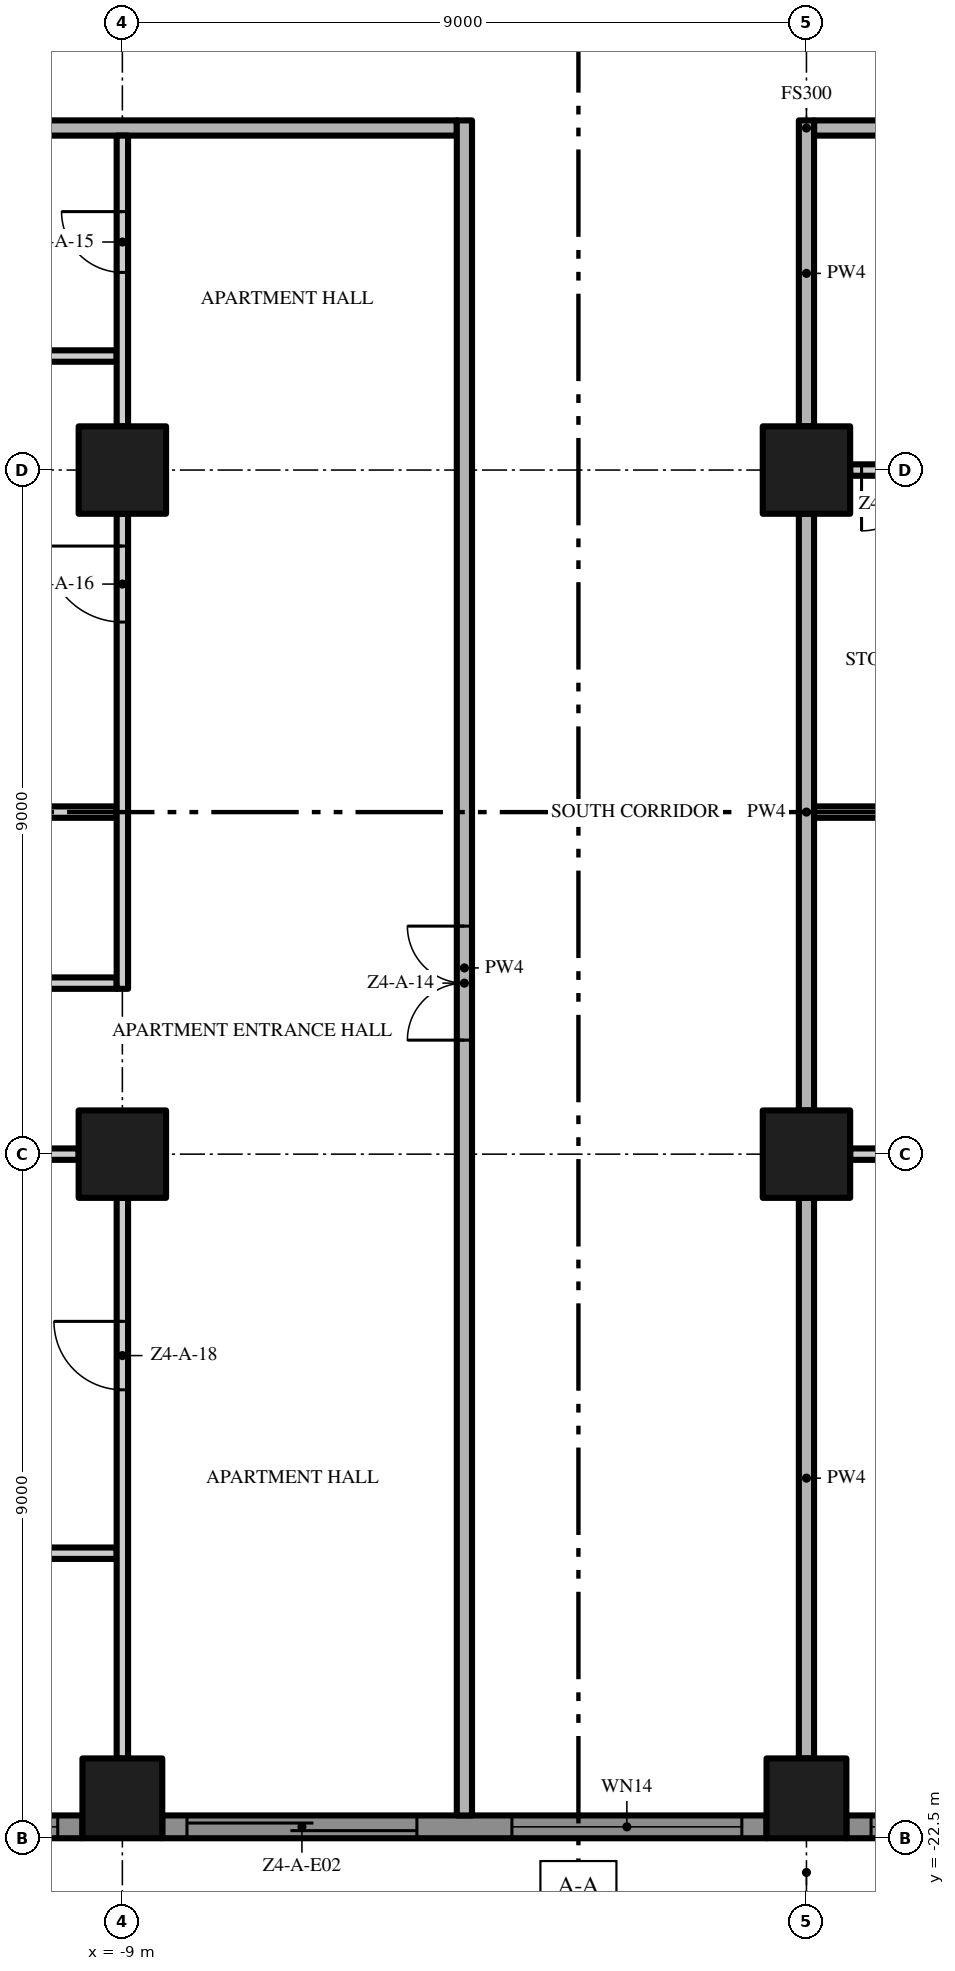
"""IFC4 building model, lengths in metres.
Left out: names, types, materials, properties, quantities, classifications, styles, units other than length and angle.
Written with IfcOpenShell. Run it as: python <this file> out.ifc"""

import sys

from ifc_helpers import new_model, si_unit, direction, frame, frame_2d, origin, origin_2d, place, context, subcontext, project, spatial, polyline, rectangle, outline, extrude, element, fill, save


model = new_model("IFC4")
c1 = context("Model", 3, precision=1e-05, world=origin(), true_north=direction((0.0, 1.0)))
c2 = subcontext(c1, "Body", "Model", "MODEL_VIEW")
j1 = project(units=[si_unit("LENGTHUNIT", "METRE"), si_unit("PLANEANGLEUNIT", "RADIAN")], contexts=[c1])
p1 = place(None, origin())
s1 = spatial("IfcSite", under=j1, at=p1, CompositionType="ELEMENT")
p2 = place(p1, origin())
s2 = spatial("IfcBuilding", under=s1, at=p2, CompositionType="ELEMENT")
p3 = place(p2, frame((0.0, 0.0, 184.4)))
s3 = spatial("IfcBuildingStorey", under=s2, at=p3, CompositionType="ELEMENT", Elevation=184.4)
p4 = place(p3, frame((-9.0, -13.5, 0.0), z_axis=(0.0, 0.0, 1.0), x_axis=(1.0, 0.0, 0.0)))
e1 = element("IfcColumn", 1, at=p4, inside=s3, PredefinedType="COLUMN", context=c2, shape_type="SweptSolid", body=[
    extrude(rectangle(XDim=1.15, YDim=1.15, at=origin_2d()), origin(), (0.0, 0.0, 1.0), 3.5),
])
p5 = place(p3, frame((-9.0, -21.975, 0.0), z_axis=(0.0, 0.0, 1.0), x_axis=(1.0, 0.0, 0.0)))
e2 = element("IfcColumn", 2, at=p5, inside=s3, PredefinedType="COLUMN", context=c2, shape_type="SweptSolid", body=[
    extrude(rectangle(XDim=1.05, YDim=1.05, at=origin_2d()), origin(), (0.0, 0.0, 1.0), 3.5),
])
for number, where, z_axis, x_axis in (
    (3, (-9.0, -4.5, 0.0), (0.0, 0.0, 1.0), (1.0, 0.0, 0.0)),
    (4, (0.0, -13.5, 0.0), (0.0, 0.0, 1.0), (1.0, 0.0, 0.0)),
):
    element("IfcColumn", number, at=place(p3, frame(where, z_axis=z_axis, x_axis=x_axis)), inside=s3, PredefinedType="COLUMN", context=c2, shape_type="SweptSolid", body=[
        extrude(rectangle(XDim=1.15, YDim=1.15, at=origin_2d()), origin(), (0.0, 0.0, 1.0), 3.5),
    ])
p6 = place(p3, frame((0.0, -21.975, 0.0), z_axis=(0.0, 0.0, 1.0), x_axis=(1.0, 0.0, 0.0)))
e5 = element("IfcColumn", 5, at=p6, inside=s3, PredefinedType="COLUMN", context=c2, shape_type="SweptSolid", body=[
    extrude(rectangle(XDim=1.05, YDim=1.05, at=origin_2d()), origin(), (0.0, 0.0, 1.0), 3.5),
])
p7 = place(p3, frame((0.0, -4.5, 0.0), z_axis=(0.0, 0.0, 1.0), x_axis=(1.0, 0.0, 0.0)))
e6 = element("IfcColumn", 6, at=p7, inside=s3, PredefinedType="COLUMN", context=c2, shape_type="SweptSolid", body=[
    extrude(rectangle(XDim=1.15, YDim=1.15, at=origin_2d()), origin(), (0.0, 0.0, 1.0), 3.5),
])
p8 = place(p3, frame((-9.525, -22.35, 0.0), z_axis=(0.0, 0.0, 1.0), x_axis=(-1.0, 0.0, 0.0)))
e7 = element("IfcWall", 7, at=p8, inside=s3, PredefinedType="SOLIDWALL", context=c2, shape_type="SweptSolid", body=[
    extrude(rectangle(XDim=7.95, YDim=0.3, at=frame_2d((3.975, 0.0))), origin(), (0.0, 0.0, 1.0), 3.5),
])
p9 = place(p8, frame((4.6, 0.0, 0.45)))
e8 = element("IfcOpeningElement", 8, at=p9, cuts=e7, PredefinedType="OPENING", context=c2, shape_type="SweptSolid", body=[
    extrude(rectangle(XDim=3.025, YDim=2.65, at=frame_2d((1.512, 1.325))), frame((0.0, 0.16, 0.0), z_axis=(0.0, -1.0, 0.0), x_axis=(1.0, 0.0, 0.0)), (0.0, 0.0, 1.0), 0.32),
])
p10 = place(p8, frame((0.325, 0.0, 0.45)))
e9 = element("IfcOpeningElement", 9, at=p10, cuts=e7, PredefinedType="OPENING", context=c2, shape_type="SweptSolid", body=[
    extrude(rectangle(XDim=3.025, YDim=2.65, at=frame_2d((1.512, 1.325))), frame((0.0, 0.16, 0.0), z_axis=(0.0, -1.0, 0.0), x_axis=(1.0, 0.0, 0.0)), (0.0, 0.0, 1.0), 0.32),
])
p11 = place(p3, frame((-0.525, -22.35, 0.0), z_axis=(0.0, 0.0, 1.0), x_axis=(-1.0, 0.0, 0.0)))
e10 = element("IfcWall", 10, at=p11, inside=s3, PredefinedType="SOLIDWALL", context=c2, shape_type="SweptSolid", body=[
    extrude(rectangle(XDim=7.95, YDim=0.3, at=frame_2d((3.975, 0.0))), origin(), (0.0, 0.0, 1.0), 3.5),
])
p12 = place(p11, frame((4.6, 0.0, 0.0)))
e11 = element("IfcOpeningElement", 11, at=p12, cuts=e10, PredefinedType="OPENING", context=c2, shape_type="SweptSolid", body=[
    extrude(rectangle(XDim=3.025, YDim=2.4, at=frame_2d((1.512, 1.2))), frame((0.0, 0.16, 0.0), z_axis=(0.0, -1.0, 0.0), x_axis=(1.0, 0.0, 0.0)), (0.0, 0.0, 1.0), 0.32),
])
p13 = place(p11, frame((0.325, 0.0, 0.45)))
e12 = element("IfcOpeningElement", 12, at=p13, cuts=e10, PredefinedType="OPENING", context=c2, shape_type="SweptSolid", body=[
    extrude(rectangle(XDim=3.025, YDim=2.65, at=frame_2d((1.512, 1.325))), frame((0.0, 0.16, 0.0), z_axis=(0.0, -1.0, 0.0), x_axis=(1.0, 0.0, 0.0)), (0.0, 0.0, 1.0), 0.32),
])
p14 = place(p3, frame((8.475, -22.35, 0.0), z_axis=(0.0, 0.0, 1.0), x_axis=(-1.0, 0.0, 0.0)))
e13 = element("IfcWall", 13, at=p14, inside=s3, PredefinedType="SOLIDWALL", context=c2, shape_type="SweptSolid", body=[
    extrude(rectangle(XDim=7.95, YDim=0.3, at=frame_2d((3.975, 0.0))), origin(), (0.0, 0.0, 1.0), 3.5),
])
p15 = place(p14, frame((4.6, 0.0, 0.45)))
e14 = element("IfcOpeningElement", 14, at=p15, cuts=e13, PredefinedType="OPENING", context=c2, shape_type="SweptSolid", body=[
    extrude(rectangle(XDim=3.025, YDim=2.65, at=frame_2d((1.512, 1.325))), frame((0.0, 0.16, 0.0), z_axis=(0.0, -1.0, 0.0), x_axis=(1.0, 0.0, 0.0)), (0.0, 0.0, 1.0), 0.32),
])
p16 = place(p14, frame((0.325, 0.0, 0.0)))
e15 = element("IfcOpeningElement", 15, at=p16, cuts=e13, PredefinedType="OPENING", context=c2, shape_type="SweptSolid", body=[
    extrude(rectangle(XDim=3.025, YDim=2.4, at=frame_2d((1.512, 1.2))), frame((0.0, 0.16, 0.0), z_axis=(0.0, -1.0, 0.0), x_axis=(1.0, 0.0, 0.0)), (0.0, 0.0, 1.0), 0.32),
])
p17 = place(p3, origin())
e16 = element("IfcWall", 16, at=p17, inside=s3, PredefinedType="USERDEFINED", context=c2, shape_type="SweptSolid", body=[
    extrude(outline(polyline([(-22.5, -25.149), (-21.0, -25.485), (-20.625, -25.5), (-19.5, -25.369), (-18.0, -24.845), (-16.5, -24.112), (-15.0, -23.451), (-13.5, -23.115), (-13.125, -23.1), (-12.0, -23.231), (-10.5, -23.755), (-9.0, -24.488), (-7.5, -25.149), (-6.0, -25.485), (-5.625, -25.5), (-4.5, -25.369), (-3.0, -24.845), (-1.5, -24.112), (0.0, -23.451), (1.5, -23.115), (1.875, -23.1), (3.0, -23.231), (4.5, -23.755), (6.0, -24.488), (7.5, -25.149), (9.0, -25.485), (9.375, -25.5), (10.5, -25.369), (12.0, -24.845), (13.5, -24.112), (15.0, -23.451), (16.5, -23.115), (16.875, -23.1), (18.0, -23.231), (19.5, -23.755), (21.0, -24.488), (22.5, -25.149), (22.601, -24.92), (21.105, -24.261), (19.596, -23.524), (18.056, -22.986), (16.885, -22.849), (16.467, -22.866), (14.921, -23.213), (13.395, -23.885), (11.904, -24.614), (10.444, -25.124), (9.365, -25.249), (9.033, -25.236), (7.579, -24.91), (6.105, -24.261), (4.596, -23.524), (3.056, -22.986), (1.885, -22.849), (1.467, -22.866), (-0.079, -23.213), (-1.605, -23.885), (-3.096, -24.614), (-4.556, -25.124), (-5.635, -25.249), (-5.967, -25.236), (-7.421, -24.91), (-8.895, -24.261), (-10.404, -23.524), (-11.944, -22.986), (-13.115, -22.849), (-13.533, -22.866), (-15.079, -23.213), (-16.605, -23.885), (-18.096, -24.614), (-19.556, -25.124), (-20.635, -25.249), (-20.967, -25.236), (-22.445, -24.905), (-22.5, -25.149)])), origin(), (0.0, 0.0, 1.0), 0.9),
])
p18 = place(p3, frame((-9.075, -18.75, 0.0), z_axis=(0.0, 0.0, 1.0), x_axis=(-1.0, 0.0, 0.0)))
e17 = element("IfcWall", 17, at=p18, inside=s3, PredefinedType="PARTITIONING", context=c2, shape_type="SweptSolid", body=[
    extrude(rectangle(XDim=4.35, YDim=0.15, at=frame_2d((2.175, 0.0))), origin(), (0.0, 0.0, 1.0), 3.5),
])
p19 = place(p18, frame((1.7, 0.0, 0.0)))
e18 = element("IfcOpeningElement", 18, at=p19, cuts=e17, PredefinedType="OPENING", context=c2, shape_type="SweptSolid", body=[
    extrude(rectangle(XDim=0.9, YDim=2.1, at=frame_2d((0.45, 1.05))), frame((0.0, 0.085, 0.0), z_axis=(0.0, -1.0, 0.0), x_axis=(1.0, 0.0, 0.0)), (0.0, 0.0, 1.0), 0.17),
])
p20 = place(p3, frame((-13.425, -13.5, 0.0), z_axis=(0.0, 0.0, 1.0), x_axis=(1.0, 0.0, 0.0)))
e19 = element("IfcWall", 19, at=p20, inside=s3, PredefinedType="PARTITIONING", context=c2, shape_type="SweptSolid", body=[
    extrude(rectangle(XDim=3.85, YDim=0.15, at=frame_2d((1.925, 0.0))), origin(), (0.0, 0.0, 1.0), 3.5),
])
p21 = place(p3, frame((8.425, -13.5, 0.0), z_axis=(0.0, 0.0, 1.0), x_axis=(-1.0, 0.0, 0.0)))
e20 = element("IfcWall", 20, at=p21, inside=s3, PredefinedType="PARTITIONING", context=c2, shape_type="SweptSolid", body=[
    extrude(rectangle(XDim=7.85, YDim=0.15, at=frame_2d((3.925, 0.0))), origin(), (0.0, 0.0, 1.0), 3.5),
])
p22 = place(p21, frame((4.15, 0.0, 0.0)))
e21 = element("IfcOpeningElement", 21, at=p22, cuts=e20, PredefinedType="OPENING", context=c2, shape_type="SweptSolid", body=[
    extrude(rectangle(XDim=1.8, YDim=2.4, at=frame_2d((0.9, 1.2))), frame((0.0, 0.085, 0.0), z_axis=(0.0, -1.0, 0.0), x_axis=(1.0, 0.0, 0.0)), (0.0, 0.0, 1.0), 0.17),
])
p23 = place(p3, frame((-13.425, -11.25, 0.0), z_axis=(0.0, 0.0, 1.0), x_axis=(1.0, 0.0, 0.0)))
e22 = element("IfcWall", 22, at=p23, inside=s3, PredefinedType="PARTITIONING", context=c2, shape_type="SweptSolid", body=[
    extrude(rectangle(XDim=4.35, YDim=0.15, at=frame_2d((2.175, 0.0))), origin(), (0.0, 0.0, 1.0), 3.5),
])
p24 = place(p23, frame((1.75, 0.0, 0.0)))
e23 = element("IfcOpeningElement", 23, at=p24, cuts=e22, PredefinedType="OPENING", context=c2, shape_type="SweptSolid", body=[
    extrude(rectangle(XDim=0.9, YDim=2.1, at=frame_2d((0.45, 1.05))), frame((0.0, 0.085, 0.0), z_axis=(0.0, -1.0, 0.0), x_axis=(1.0, 0.0, 0.0)), (0.0, 0.0, 1.0), 0.17),
])
p25 = place(p3, frame((-13.425, -9.0, 0.0), z_axis=(0.0, 0.0, 1.0), x_axis=(1.0, 0.0, 0.0)))
e24 = element("IfcWall", 24, at=p25, inside=s3, PredefinedType="PARTITIONING", context=c2, shape_type="SweptSolid", body=[
    extrude(rectangle(XDim=4.35, YDim=0.15, at=frame_2d((2.175, 0.0))), origin(), (0.0, 0.0, 1.0), 3.5),
])
p26 = place(p3, frame((0.1, -9.0, 0.0), z_axis=(0.0, 0.0, 1.0), x_axis=(1.0, 0.0, 0.0)))
e25 = element("IfcWall", 25, at=p26, inside=s3, PredefinedType="PARTITIONING", context=c2, shape_type="SweptSolid", body=[
    extrude(rectangle(XDim=13.4, YDim=0.15, at=frame_2d((6.7, 0.0))), origin(), (0.0, 0.0, 1.0), 3.5),
])
p27 = place(p26, frame((6.9, 0.0, 0.0)))
e26 = element("IfcOpeningElement", 26, at=p27, cuts=e25, PredefinedType="OPENING", context=c2, shape_type="SweptSolid", body=[
    extrude(rectangle(XDim=1.0, YDim=2.4, at=frame_2d((0.5, 1.2))), frame((0.0, 0.085, 0.0), z_axis=(0.0, -1.0, 0.0), x_axis=(1.0, 0.0, 0.0)), (0.0, 0.0, 1.0), 0.17),
])
p28 = place(p3, frame((8.425, -4.5, 0.0), z_axis=(0.0, 0.0, 1.0), x_axis=(-1.0, 0.0, 0.0)))
e27 = element("IfcWall", 27, at=p28, inside=s3, PredefinedType="PARTITIONING", context=c2, shape_type="SweptSolid", body=[
    extrude(rectangle(XDim=7.85, YDim=0.15, at=frame_2d((3.925, 0.0))), origin(), (0.0, 0.0, 1.0), 3.5),
])
p29 = place(p28, frame((6.9, 0.0, 0.0)))
e28 = element("IfcOpeningElement", 28, at=p29, cuts=e27, PredefinedType="OPENING", context=c2, shape_type="SweptSolid", body=[
    extrude(rectangle(XDim=0.8, YDim=2.0, at=frame_2d((0.4, 1.0))), frame((0.0, 0.085, 0.0), z_axis=(0.0, -1.0, 0.0), x_axis=(1.0, 0.0, 0.0)), (0.0, 0.0, 1.0), 0.17),
])
p30 = place(p28, frame((4.875, 0.0, 0.0)))
e29 = element("IfcOpeningElement", 29, at=p30, cuts=e27, PredefinedType="OPENING", context=c2, shape_type="SweptSolid", body=[
    extrude(rectangle(XDim=0.8, YDim=2.0, at=frame_2d((0.4, 1.0))), frame((0.0, 0.085, 0.0), z_axis=(0.0, -1.0, 0.0), x_axis=(1.0, 0.0, 0.0)), (0.0, 0.0, 1.0), 0.17),
])
p31 = place(p3, frame((-13.425, -3.0, 0.0), z_axis=(0.0, 0.0, 1.0), x_axis=(1.0, 0.0, 0.0)))
e30 = element("IfcWall", 30, at=p31, inside=s3, PredefinedType="PARTITIONING", context=c2, shape_type="SweptSolid", body=[
    extrude(rectangle(XDim=4.35, YDim=0.15, at=frame_2d((2.175, 0.0))), origin(), (0.0, 0.0, 1.0), 3.5),
])
p32 = place(p3, frame((-17.4, 0.0, 0.0), z_axis=(0.0, 0.0, 1.0), x_axis=(1.0, 0.0, 0.0)))
e31 = element("IfcWall", 31, at=p32, inside=s3, PredefinedType="PARTITIONING", context=c2, shape_type="SweptSolid", body=[
    extrude(rectangle(XDim=12.8, YDim=0.2, at=frame_2d((6.4, 0.0))), origin(), (0.0, 0.0, 1.0), 3.5),
])
p33 = place(p3, frame((17.4, 0.0, 0.0), z_axis=(0.0, 0.0, 1.0), x_axis=(-1.0, 0.0, 0.0)))
e32 = element("IfcWall", 32, at=p33, inside=s3, PredefinedType="PARTITIONING", context=c2, shape_type="SweptSolid", body=[
    extrude(rectangle(XDim=17.3, YDim=0.2, at=frame_2d((8.65, 0.0))), origin(), (0.0, 0.0, 1.0), 3.5),
])
p34 = place(p33, frame((7.65, 0.0, 0.0)))
e33 = element("IfcOpeningElement", 33, at=p34, cuts=e32, PredefinedType="OPENING", context=c2, shape_type="SweptSolid", body=[
    extrude(rectangle(XDim=1.5, YDim=2.4, at=frame_2d((0.75, 1.2))), frame((0.0, 0.11, 0.0), z_axis=(0.0, -1.0, 0.0), x_axis=(1.0, 0.0, 0.0)), (0.0, 0.0, 1.0), 0.22),
])
p35 = place(p3, frame((-9.0, -21.45, 0.0), z_axis=(0.0, 0.0, 1.0), x_axis=(0.0, 1.0, 0.0)))
e34 = element("IfcWall", 34, at=p35, inside=s3, PredefinedType="PARTITIONING", context=c2, shape_type="SweptSolid", body=[
    extrude(rectangle(XDim=7.375, YDim=0.15, at=frame_2d((3.688, 0.0))), origin(), (0.0, 0.0, 1.0), 3.5),
])
p36 = place(p35, frame((4.85, 0.0, 0.0)))
e35 = element("IfcOpeningElement", 35, at=p36, cuts=e34, PredefinedType="OPENING", context=c2, shape_type="SweptSolid", body=[
    extrude(rectangle(XDim=0.9, YDim=2.1, at=frame_2d((0.45, 1.05))), frame((0.0, 0.085, 0.0), z_axis=(0.0, -1.0, 0.0), x_axis=(1.0, 0.0, 0.0)), (0.0, 0.0, 1.0), 0.17),
])
p37 = place(p3, frame((-9.0, -11.325, 0.0), z_axis=(0.0, 0.0, 1.0), x_axis=(0.0, 1.0, 0.0)))
e36 = element("IfcWall", 36, at=p37, inside=s3, PredefinedType="PARTITIONING", context=c2, shape_type="SweptSolid", body=[
    extrude(rectangle(XDim=6.25, YDim=0.15, at=frame_2d((3.125, 0.0))), origin(), (0.0, 0.0, 1.0), 3.5),
])
p38 = place(p37, frame((4.825, 0.0, 0.0)))
e37 = element("IfcOpeningElement", 37, at=p38, cuts=e36, PredefinedType="OPENING", context=c2, shape_type="SweptSolid", body=[
    extrude(rectangle(XDim=1.0, YDim=2.4, at=frame_2d((0.5, 1.2))), frame((0.0, 0.085, 0.0), z_axis=(0.0, -1.0, 0.0), x_axis=(1.0, 0.0, 0.0)), (0.0, 0.0, 1.0), 0.17),
])
p39 = place(p3, frame((-9.0, -3.925, 0.0), z_axis=(0.0, 0.0, 1.0), x_axis=(0.0, 1.0, 0.0)))
e38 = element("IfcWall", 38, at=p39, inside=s3, PredefinedType="PARTITIONING", context=c2, shape_type="SweptSolid", body=[
    extrude(rectangle(XDim=3.825, YDim=0.15, at=frame_2d((1.913, 0.0))), origin(), (0.0, 0.0, 1.0), 3.5),
])
p40 = place(p39, frame((2.025, 0.0, 0.0)))
e39 = element("IfcOpeningElement", 39, at=p40, cuts=e38, PredefinedType="OPENING", context=c2, shape_type="SweptSolid", body=[
    extrude(rectangle(XDim=0.8, YDim=2.0, at=frame_2d((0.4, 1.0))), frame((0.0, 0.085, 0.0), z_axis=(0.0, -1.0, 0.0), x_axis=(1.0, 0.0, 0.0)), (0.0, 0.0, 1.0), 0.17),
])
p41 = place(p3, frame((-4.5, -22.2, 0.0), z_axis=(0.0, 0.0, 1.0), x_axis=(0.0, 1.0, 0.0)))
e40 = element("IfcWall", 40, at=p41, inside=s3, PredefinedType="PARTITIONING", context=c2, shape_type="SweptSolid", body=[
    extrude(rectangle(XDim=22.3, YDim=0.2, at=frame_2d((11.15, 0.0))), origin(), (0.0, 0.0, 1.0), 3.5),
])
p42 = place(p41, frame((10.2, 0.0, 0.0)))
e41 = element("IfcOpeningElement", 41, at=p42, cuts=e40, PredefinedType="OPENING", context=c2, shape_type="SweptSolid", body=[
    extrude(rectangle(XDim=1.5, YDim=2.4, at=frame_2d((0.75, 1.2))), frame((0.0, 0.11, 0.0), z_axis=(0.0, -1.0, 0.0), x_axis=(1.0, 0.0, 0.0)), (0.0, 0.0, 1.0), 0.22),
])
p43 = place(p3, frame((0.0, -21.45, 0.0), z_axis=(0.0, 0.0, 1.0), x_axis=(0.0, 1.0, 0.0)))
e42 = element("IfcWall", 42, at=p43, inside=s3, PredefinedType="PARTITIONING", context=c2, shape_type="SweptSolid", body=[
    extrude(rectangle(XDim=7.375, YDim=0.2, at=frame_2d((3.688, 0.0))), origin(), (0.0, 0.0, 1.0), 3.5),
])
p44 = place(p3, frame((0.0, -12.925, 0.0), z_axis=(0.0, 0.0, 1.0), x_axis=(0.0, 1.0, 0.0)))
e43 = element("IfcWall", 43, at=p44, inside=s3, PredefinedType="PARTITIONING", context=c2, shape_type="SweptSolid", body=[
    extrude(rectangle(XDim=7.85, YDim=0.2, at=frame_2d((3.925, 0.0))), origin(), (0.0, 0.0, 1.0), 3.5),
])
p45 = place(p3, frame((0.0, -3.925, 0.0), z_axis=(0.0, 0.0, 1.0), x_axis=(0.0, 1.0, 0.0)))
e44 = element("IfcWall", 44, at=p45, inside=s3, PredefinedType="PARTITIONING", context=c2, shape_type="SweptSolid", body=[
    extrude(rectangle(XDim=4.025, YDim=0.2, at=frame_2d((2.013, 0.0))), origin(), (0.0, 0.0, 1.0), 3.5),
])
p46 = place(p10, origin())
e45 = element("IfcWindow", 45, at=p46, inside=s3, PartitioningType="SINGLE_PANEL", PredefinedType="WINDOW", context=c2, shape_type="SweptSolid", body=[
    extrude(rectangle(XDim=3.025, YDim=2.65, at=frame_2d((1.512, 1.325))), frame((0.0, 0.03, 0.0), z_axis=(0.0, -1.0, 0.0), x_axis=(1.0, 0.0, 0.0)), (0.0, 0.0, 1.0), 0.06),
])
fill(e9, e45)
p47 = place(p12, origin())
e46 = element("IfcDoor", 46, at=p47, inside=s3, OperationType="SINGLE_SWING_LEFT", PredefinedType="DOOR", context=c2, shape_type="SweptSolid", body=[
    extrude(rectangle(XDim=3.025, YDim=2.4, at=frame_2d((1.512, 1.2))), frame((0.0, 0.025, 0.0), z_axis=(0.0, -1.0, 0.0), x_axis=(1.0, 0.0, 0.0)), (0.0, 0.0, 1.0), 0.05),
])
fill(e11, e46)
p48 = place(p13, origin())
e47 = element("IfcWindow", 47, at=p48, inside=s3, PartitioningType="SINGLE_PANEL", PredefinedType="WINDOW", context=c2, shape_type="SweptSolid", body=[
    extrude(rectangle(XDim=3.025, YDim=2.65, at=frame_2d((1.512, 1.325))), frame((0.0, 0.03, 0.0), z_axis=(0.0, -1.0, 0.0), x_axis=(1.0, 0.0, 0.0)), (0.0, 0.0, 1.0), 0.06),
])
fill(e12, e47)
p49 = place(p15, origin())
e48 = element("IfcWindow", 48, at=p49, inside=s3, PartitioningType="SINGLE_PANEL", PredefinedType="WINDOW", context=c2, shape_type="SweptSolid", body=[
    extrude(rectangle(XDim=3.025, YDim=2.65, at=frame_2d((1.512, 1.325))), frame((0.0, 0.03, 0.0), z_axis=(0.0, -1.0, 0.0), x_axis=(1.0, 0.0, 0.0)), (0.0, 0.0, 1.0), 0.06),
])
fill(e14, e48)
p50 = place(p42, origin())
e49 = element("IfcDoor", 49, at=p50, inside=s3, OperationType="DOUBLE_DOOR_SINGLE_SWING", PredefinedType="DOOR", context=c2, shape_type="SweptSolid", body=[
    extrude(rectangle(XDim=1.5, YDim=2.4, at=frame_2d((0.75, 1.2))), frame((0.0, 0.025, 0.0), z_axis=(0.0, -1.0, 0.0), x_axis=(1.0, 0.0, 0.0)), (0.0, 0.0, 1.0), 0.05),
])
fill(e41, e49)
p51 = place(p40, origin())
e50 = element("IfcDoor", 50, at=p51, inside=s3, OperationType="SINGLE_SWING_RIGHT", PredefinedType="DOOR", context=c2, shape_type="SweptSolid", body=[
    extrude(rectangle(XDim=0.8, YDim=2.0, at=frame_2d((0.4, 1.0))), frame((0.0, 0.025, 0.0), z_axis=(0.0, -1.0, 0.0), x_axis=(1.0, 0.0, 0.0)), (0.0, 0.0, 1.0), 0.05),
])
fill(e39, e50)
p52 = place(p38, origin())
e51 = element("IfcDoor", 51, at=p52, inside=s3, OperationType="SINGLE_SWING_RIGHT", PredefinedType="DOOR", context=c2, shape_type="SweptSolid", body=[
    extrude(rectangle(XDim=1.0, YDim=2.4, at=frame_2d((0.5, 1.2))), frame((0.0, 0.025, 0.0), z_axis=(0.0, -1.0, 0.0), x_axis=(1.0, 0.0, 0.0)), (0.0, 0.0, 1.0), 0.05),
])
fill(e37, e51)
p53 = place(p36, origin())
e52 = element("IfcDoor", 52, at=p53, inside=s3, OperationType="SINGLE_SWING_RIGHT", PredefinedType="DOOR", context=c2, shape_type="SweptSolid", body=[
    extrude(rectangle(XDim=0.9, YDim=2.1, at=frame_2d((0.45, 1.05))), frame((0.0, 0.025, 0.0), z_axis=(0.0, -1.0, 0.0), x_axis=(1.0, 0.0, 0.0)), (0.0, 0.0, 1.0), 0.05),
])
fill(e35, e52)
p54 = place(p29, origin())
e53 = element("IfcDoor", 53, at=p54, inside=s3, OperationType="SINGLE_SWING_RIGHT", PredefinedType="DOOR", context=c2, shape_type="SweptSolid", body=[
    extrude(rectangle(XDim=0.8, YDim=2.0, at=frame_2d((0.4, 1.0))), frame((0.0, 0.025, 0.0), z_axis=(0.0, -1.0, 0.0), x_axis=(1.0, 0.0, 0.0)), (0.0, 0.0, 1.0), 0.05),
])
fill(e28, e53)
save(model, sys.argv[1])
